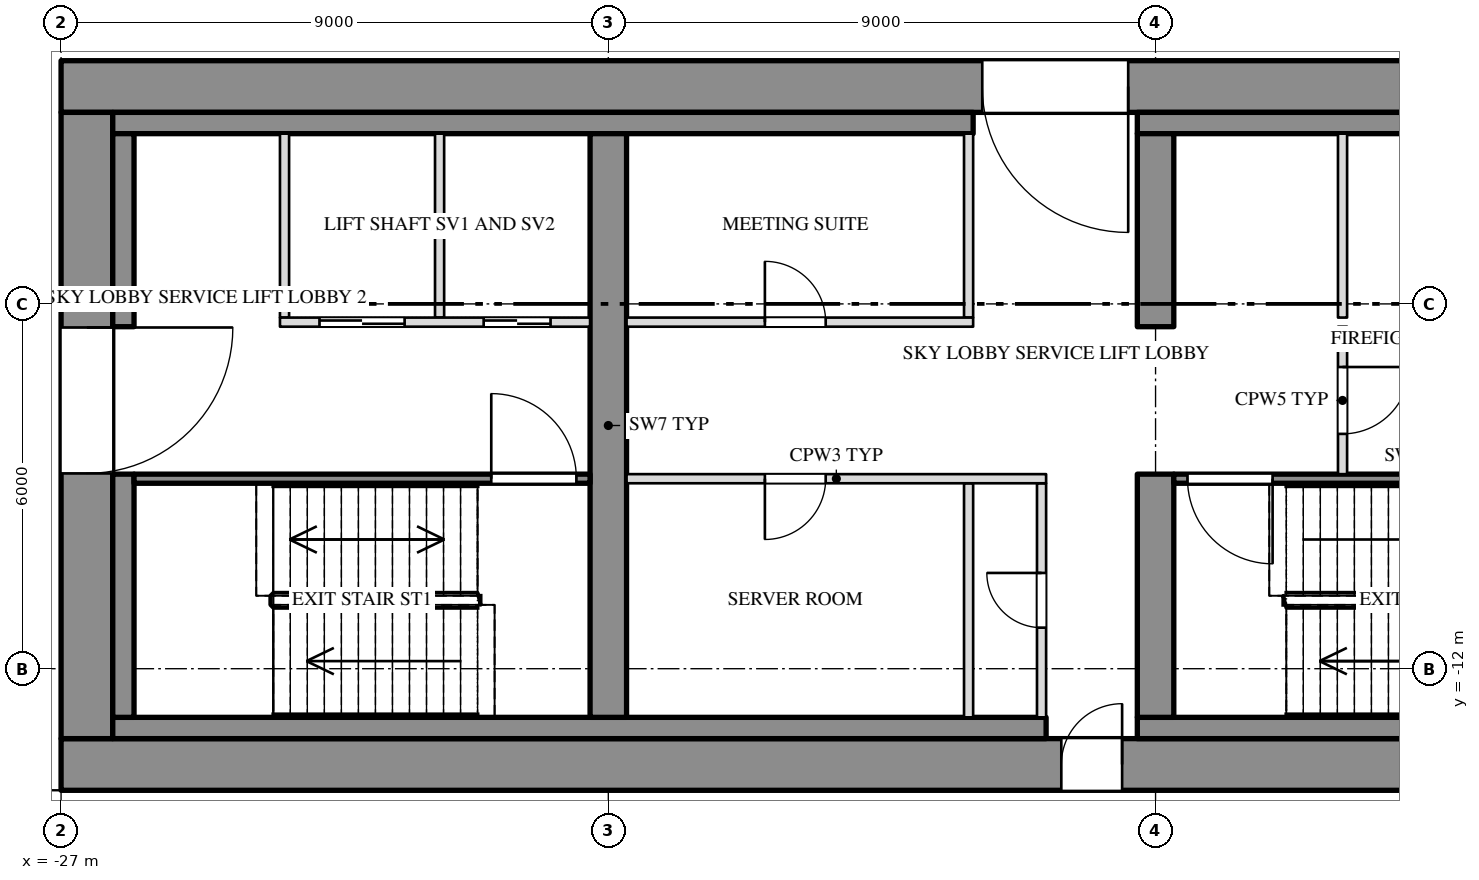
"""IFC4 building model, lengths in metres.
Left out: names, types, materials, properties, quantities, classifications, styles, units other than length and angle.
Written with IfcOpenShell. Run it as: python <this file> out.ifc"""

import sys

from ifc_helpers import new_model, si_unit, direction, frame, frame_2d, origin, place, context, subcontext, project, spatial, rectangle, extrude, element, fill, save


model = new_model("IFC4")
c1 = context("Model", 3, precision=1e-05, world=origin(), true_north=direction((0.0, 1.0)))
c2 = subcontext(c1, "Body", "Model", "MODEL_VIEW")
j1 = project(units=[si_unit("LENGTHUNIT", "METRE"), si_unit("PLANEANGLEUNIT", "RADIAN")], contexts=[c1])
p1 = place(None, origin())
s1 = spatial("IfcSite", under=j1, at=p1, CompositionType="ELEMENT")
p2 = place(p1, origin())
s2 = spatial("IfcBuilding", under=s1, at=p2, CompositionType="ELEMENT")
p3 = place(p2, frame((0.0, 0.0, 212.5)))
s3 = spatial("IfcBuildingStorey", under=s2, at=p3, CompositionType="ELEMENT", Elevation=212.5)
p4 = place(p3, frame((-27.0, -2.425, 0.0), z_axis=(0.0, 0.0, 1.0), x_axis=(1.0, 0.0, 0.0)))
e1 = element("IfcWall", 1, at=p4, inside=s3, PredefinedType="SHEAR", context=c2, shape_type="SweptSolid", body=[
    extrude(rectangle(XDim=54.0, YDim=0.85, at=frame_2d((27.0, 0.0))), origin(), (0.0, 0.0, 1.0), 3.65),
])
p5 = place(p4, frame((15.15, 0.0, 0.0)))
e2 = element("IfcOpeningElement", 2, at=p5, cuts=e1, PredefinedType="OPENING", context=c2, shape_type="SweptSolid", body=[
    extrude(rectangle(XDim=2.4, YDim=2.1, at=frame_2d((1.2, 1.05))), frame((0.0, 0.437, 0.0), z_axis=(0.0, -1.0, 0.0), x_axis=(1.0, 0.0, 0.0)), (0.0, 0.0, 1.0), 0.874),
])
p6 = place(p4, frame((36.45, 0.0, 0.0)))
e3 = element("IfcOpeningElement", 3, at=p6, cuts=e1, PredefinedType="OPENING", context=c2, shape_type="SweptSolid", body=[
    extrude(rectangle(XDim=2.4, YDim=2.1, at=frame_2d((1.2, 1.05))), frame((0.0, 0.437, 0.0), z_axis=(0.0, -1.0, 0.0), x_axis=(1.0, 0.0, 0.0)), (0.0, 0.0, 1.0), 0.874),
])
p7 = place(p3, frame((-27.0, -13.575, 0.0), z_axis=(0.0, 0.0, 1.0), x_axis=(1.0, 0.0, 0.0)))
e4 = element("IfcWall", 4, at=p7, inside=s3, PredefinedType="SHEAR", context=c2, shape_type="SweptSolid", body=[
    extrude(rectangle(XDim=54.0, YDim=0.85, at=frame_2d((27.0, 0.0))), origin(), (0.0, 0.0, 1.0), 3.65),
])
p8 = place(p7, frame((16.45, 0.0, 0.0)))
e5 = element("IfcOpeningElement", 5, at=p8, cuts=e4, PredefinedType="OPENING", context=c2, shape_type="SweptSolid", body=[
    extrude(rectangle(XDim=1.0, YDim=2.1, at=frame_2d((0.5, 1.05))), frame((0.0, 0.437, 0.0), z_axis=(0.0, -1.0, 0.0), x_axis=(1.0, 0.0, 0.0)), (0.0, 0.0, 1.0), 0.874),
])
p9 = place(p7, frame((36.55, 0.0, 0.0)))
e6 = element("IfcOpeningElement", 6, at=p9, cuts=e4, PredefinedType="OPENING", context=c2, shape_type="SweptSolid", body=[
    extrude(rectangle(XDim=1.0, YDim=2.1, at=frame_2d((0.5, 1.05))), frame((0.0, 0.437, 0.0), z_axis=(0.0, -1.0, 0.0), x_axis=(1.0, 0.0, 0.0)), (0.0, 0.0, 1.0), 0.874),
])
p10 = place(p3, frame((-26.575, -13.15, 0.0), z_axis=(0.0, 0.0, 1.0), x_axis=(0.0, 1.0, 0.0)))
e7 = element("IfcWall", 7, at=p10, inside=s3, PredefinedType="SHEAR", context=c2, shape_type="SweptSolid", body=[
    extrude(rectangle(XDim=10.3, YDim=0.85, at=frame_2d((5.15, 0.0))), origin(), (0.0, 0.0, 1.0), 3.65),
])
p11 = place(p10, frame((4.362, 0.0, 0.0)))
e8 = element("IfcOpeningElement", 8, at=p11, cuts=e7, PredefinedType="OPENING", context=c2, shape_type="SweptSolid", body=[
    extrude(rectangle(XDim=2.4, YDim=2.1, at=frame_2d((1.2, 1.05))), frame((0.0, 0.437, 0.0), z_axis=(0.0, -1.0, 0.0), x_axis=(1.0, 0.0, 0.0)), (0.0, 0.0, 1.0), 0.874),
])
p12 = place(p3, frame((-26.15, -3.025, 0.0), z_axis=(0.0, 0.0, 1.0), x_axis=(1.0, 0.0, 0.0)))
e9 = element("IfcWall", 9, at=p12, inside=s3, PredefinedType="SHEAR", context=c2, shape_type="SweptSolid", body=[
    extrude(rectangle(XDim=14.15, YDim=0.35, at=frame_2d((7.075, 0.0))), origin(), (0.0, 0.0, 1.0), 3.65),
])
p13 = place(p3, frame((-9.3, -3.025, 0.0), z_axis=(0.0, 0.0, 1.0), x_axis=(1.0, 0.0, 0.0)))
e10 = element("IfcWall", 10, at=p13, inside=s3, PredefinedType="SHEAR", context=c2, shape_type="SweptSolid", body=[
    extrude(rectangle(XDim=18.6, YDim=0.35, at=frame_2d((9.3, 0.0))), origin(), (0.0, 0.0, 1.0), 3.65),
])
p14 = place(p3, frame((-26.15, -12.975, 0.0), z_axis=(0.0, 0.0, 1.0), x_axis=(1.0, 0.0, 0.0)))
e11 = element("IfcWall", 11, at=p14, inside=s3, PredefinedType="SHEAR", context=c2, shape_type="SweptSolid", body=[
    extrude(rectangle(XDim=15.35, YDim=0.35, at=frame_2d((7.675, 0.0))), origin(), (0.0, 0.0, 1.0), 3.65),
])
p15 = place(p3, frame((-9.3, -12.975, 0.0), z_axis=(0.0, 0.0, 1.0), x_axis=(1.0, 0.0, 0.0)))
e12 = element("IfcWall", 12, at=p15, inside=s3, PredefinedType="SHEAR", context=c2, shape_type="SweptSolid", body=[
    extrude(rectangle(XDim=18.6, YDim=0.35, at=frame_2d((9.3, 0.0))), origin(), (0.0, 0.0, 1.0), 3.65),
])
p16 = place(p3, frame((-25.975, -12.8, 0.0), z_axis=(0.0, 0.0, 1.0), x_axis=(0.0, 1.0, 0.0)))
e13 = element("IfcWall", 13, at=p16, inside=s3, PredefinedType="SHEAR", context=c2, shape_type="SweptSolid", body=[
    extrude(rectangle(XDim=4.0, YDim=0.35, at=frame_2d((2.0, 0.0))), origin(), (0.0, 0.0, 1.0), 3.65),
])
p17 = place(p3, frame((-25.975, -6.375, 0.0), z_axis=(0.0, 0.0, 1.0), x_axis=(0.0, 1.0, 0.0)))
e14 = element("IfcWall", 14, at=p17, inside=s3, PredefinedType="SHEAR", context=c2, shape_type="SweptSolid", body=[
    extrude(rectangle(XDim=3.175, YDim=0.35, at=frame_2d((1.587, 0.0))), origin(), (0.0, 0.0, 1.0), 3.65),
])
p18 = place(p3, frame((-18.0, -12.8, 0.0), z_axis=(0.0, 0.0, 1.0), x_axis=(0.0, 1.0, 0.0)))
e15 = element("IfcWall", 15, at=p18, inside=s3, PredefinedType="SHEAR", context=c2, shape_type="SweptSolid", body=[
    extrude(rectangle(XDim=9.6, YDim=0.6, at=frame_2d((4.8, 0.0))), origin(), (0.0, 0.0, 1.0), 3.65),
])
p19 = place(p3, frame((-9.0, -12.8, 0.0), z_axis=(0.0, 0.0, 1.0), x_axis=(0.0, 1.0, 0.0)))
e16 = element("IfcWall", 16, at=p19, inside=s3, PredefinedType="SHEAR", context=c2, shape_type="SweptSolid", body=[
    extrude(rectangle(XDim=4.0, YDim=0.6, at=frame_2d((2.0, 0.0))), origin(), (0.0, 0.0, 1.0), 3.65),
])
p20 = place(p3, frame((-9.0, -6.375, 0.0), z_axis=(0.0, 0.0, 1.0), x_axis=(0.0, 1.0, 0.0)))
e17 = element("IfcWall", 17, at=p20, inside=s3, PredefinedType="SHEAR", context=c2, shape_type="SweptSolid", body=[
    extrude(rectangle(XDim=3.175, YDim=0.6, at=frame_2d((1.587, 0.0))), origin(), (0.0, 0.0, 1.0), 3.65),
])
for number, where, z_axis, x_axis in (
    (18, (-20.775, -6.225, 0.0), (0.0, 0.0, 1.0), (0.0, 1.0, 0.0)),
    (19, (-23.325, -6.225, 0.0), (0.0, 0.0, 1.0), (0.0, 1.0, 0.0)),
    (20, (-12.075, -6.225, 0.0), (0.0, 0.0, 1.0), (0.0, 1.0, 0.0)),
    (21, (-5.925, -6.225, 0.0), (0.0, 0.0, 1.0), (0.0, 1.0, 0.0)),
):
    element("IfcWall", number, at=place(p3, frame(where, z_axis=z_axis, x_axis=x_axis)), inside=s3, PredefinedType="PARTITIONING", context=c2, shape_type="SweptSolid", body=[
        extrude(rectangle(XDim=3.025, YDim=0.15, at=frame_2d((1.513, 0.0))), origin(), (0.0, 0.0, 1.0), 3.65),
    ])
p21 = place(p3, frame((-10.875, -12.8, 0.0), z_axis=(0.0, 0.0, 1.0), x_axis=(0.0, 1.0, 0.0)))
e22 = element("IfcWall", 22, at=p21, inside=s3, PredefinedType="PARTITIONING", context=c2, shape_type="SweptSolid", body=[
    extrude(rectangle(XDim=3.85, YDim=0.15, at=frame_2d((1.925, 0.0))), origin(), (0.0, 0.0, 1.0), 3.65),
])
p22 = place(p21, frame((1.475, 0.0, 0.0)))
e23 = element("IfcOpeningElement", 23, at=p22, cuts=e22, PredefinedType="OPENING", context=c2, shape_type="SweptSolid", body=[
    extrude(rectangle(XDim=0.9, YDim=2.1, at=frame_2d((0.45, 1.05))), frame((0.0, 0.087, 0.0), z_axis=(0.0, -1.0, 0.0), x_axis=(1.0, 0.0, 0.0)), (0.0, 0.0, 1.0), 0.174),
])
p23 = place(p3, frame((-12.075, -12.8, 0.0), z_axis=(0.0, 0.0, 1.0), x_axis=(0.0, 1.0, 0.0)))
e24 = element("IfcWall", 24, at=p23, inside=s3, PredefinedType="PARTITIONING", context=c2, shape_type="SweptSolid", body=[
    extrude(rectangle(XDim=3.85, YDim=0.15, at=frame_2d((1.925, 0.0))), origin(), (0.0, 0.0, 1.0), 3.65),
])
p24 = place(p3, frame((-5.925, -8.8, 0.0), z_axis=(0.0, 0.0, 1.0), x_axis=(0.0, 1.0, 0.0)))
e25 = element("IfcWall", 25, at=p24, inside=s3, PredefinedType="PARTITIONING", context=c2, shape_type="SweptSolid", body=[
    extrude(rectangle(XDim=2.425, YDim=0.15, at=frame_2d((1.212, 0.0))), origin(), (0.0, 0.0, 1.0), 3.65),
])
p25 = place(p24, frame((0.662, 0.0, 0.0)))
e26 = element("IfcOpeningElement", 26, at=p25, cuts=e25, PredefinedType="OPENING", context=c2, shape_type="SweptSolid", body=[
    extrude(rectangle(XDim=1.1, YDim=2.1, at=frame_2d((0.55, 1.05))), frame((0.0, 0.087, 0.0), z_axis=(0.0, -1.0, 0.0), x_axis=(1.0, 0.0, 0.0)), (0.0, 0.0, 1.0), 0.174),
])
p26 = place(p3, frame((-23.4, -6.3, 0.0), z_axis=(0.0, 0.0, 1.0), x_axis=(1.0, 0.0, 0.0)))
e27 = element("IfcWall", 27, at=p26, inside=s3, PredefinedType="PARTITIONING", context=c2, shape_type="SweptSolid", body=[
    extrude(rectangle(XDim=5.1, YDim=0.15, at=frame_2d((2.55, 0.0))), origin(), (0.0, 0.0, 1.0), 3.65),
])
p27 = place(p26, frame((0.65, 0.0, 0.0)))
e28 = element("IfcOpeningElement", 28, at=p27, cuts=e27, PredefinedType="OPENING", context=c2, shape_type="SweptSolid", body=[
    extrude(rectangle(XDim=1.4, YDim=2.1, at=frame_2d((0.7, 1.05))), frame((0.0, 0.087, 0.0), z_axis=(0.0, -1.0, 0.0), x_axis=(1.0, 0.0, 0.0)), (0.0, 0.0, 1.0), 0.174),
])
p28 = place(p26, frame((3.35, 0.0, 0.0)))
e29 = element("IfcOpeningElement", 29, at=p28, cuts=e27, PredefinedType="OPENING", context=c2, shape_type="SweptSolid", body=[
    extrude(rectangle(XDim=1.1, YDim=2.1, at=frame_2d((0.55, 1.05))), frame((0.0, 0.087, 0.0), z_axis=(0.0, -1.0, 0.0), x_axis=(1.0, 0.0, 0.0)), (0.0, 0.0, 1.0), 0.174),
])
p29 = place(p3, frame((-17.7, -6.3, 0.0), z_axis=(0.0, 0.0, 1.0), x_axis=(1.0, 0.0, 0.0)))
e30 = element("IfcWall", 30, at=p29, inside=s3, PredefinedType="PARTITIONING", context=c2, shape_type="SweptSolid", body=[
    extrude(rectangle(XDim=5.7, YDim=0.15, at=frame_2d((2.85, 0.0))), origin(), (0.0, 0.0, 1.0), 3.65),
])
p30 = place(p29, frame((2.275, 0.0, 0.0)))
e31 = element("IfcOpeningElement", 31, at=p30, cuts=e30, PredefinedType="OPENING", context=c2, shape_type="SweptSolid", body=[
    extrude(rectangle(XDim=1.0, YDim=2.1, at=frame_2d((0.5, 1.05))), frame((0.0, 0.087, 0.0), z_axis=(0.0, -1.0, 0.0), x_axis=(1.0, 0.0, 0.0)), (0.0, 0.0, 1.0), 0.174),
])
p31 = place(p3, frame((-25.8, -8.875, 0.0), z_axis=(0.0, 0.0, 1.0), x_axis=(1.0, 0.0, 0.0)))
e32 = element("IfcWall", 32, at=p31, inside=s3, PredefinedType="SHEAR", context=c2, shape_type="SweptSolid", body=[
    extrude(rectangle(XDim=7.5, YDim=0.15, at=frame_2d((3.75, 0.0))), origin(), (0.0, 0.0, 1.0), 3.65),
])
p32 = place(p31, frame((5.875, 0.0, 0.0)))
e33 = element("IfcOpeningElement", 33, at=p32, cuts=e32, PredefinedType="OPENING", context=c2, shape_type="SweptSolid", body=[
    extrude(rectangle(XDim=1.4, YDim=2.1, at=frame_2d((0.7, 1.05))), frame((0.0, 0.087, 0.0), z_axis=(0.0, -1.0, 0.0), x_axis=(1.0, 0.0, 0.0)), (0.0, 0.0, 1.0), 0.174),
])
p33 = place(p3, frame((-17.7, -8.875, 0.0), z_axis=(0.0, 0.0, 1.0), x_axis=(1.0, 0.0, 0.0)))
e34 = element("IfcWall", 34, at=p33, inside=s3, PredefinedType="PARTITIONING", context=c2, shape_type="SweptSolid", body=[
    extrude(rectangle(XDim=6.9, YDim=0.15, at=frame_2d((3.45, 0.0))), origin(), (0.0, 0.0, 1.0), 3.65),
])
p34 = place(p33, frame((2.275, 0.0, 0.0)))
e35 = element("IfcOpeningElement", 35, at=p34, cuts=e34, PredefinedType="OPENING", context=c2, shape_type="SweptSolid", body=[
    extrude(rectangle(XDim=1.0, YDim=2.1, at=frame_2d((0.5, 1.05))), frame((0.0, 0.087, 0.0), z_axis=(0.0, -1.0, 0.0), x_axis=(1.0, 0.0, 0.0)), (0.0, 0.0, 1.0), 0.174),
])
p35 = place(p3, frame((-8.7, -8.875, 0.0), z_axis=(0.0, 0.0, 1.0), x_axis=(1.0, 0.0, 0.0)))
e36 = element("IfcWall", 36, at=p35, inside=s3, PredefinedType="SHEAR", context=c2, shape_type="SweptSolid", body=[
    extrude(rectangle(XDim=8.4, YDim=0.15, at=frame_2d((4.2, 0.0))), origin(), (0.0, 0.0, 1.0), 3.65),
])
p36 = place(p35, frame((0.225, 0.0, 0.0)))
e37 = element("IfcOpeningElement", 37, at=p36, cuts=e36, PredefinedType="OPENING", context=c2, shape_type="SweptSolid", body=[
    extrude(rectangle(XDim=1.4, YDim=2.1, at=frame_2d((0.7, 1.05))), frame((0.0, 0.087, 0.0), z_axis=(0.0, -1.0, 0.0), x_axis=(1.0, 0.0, 0.0)), (0.0, 0.0, 1.0), 0.174),
])
p37 = place(p11, origin())
e38 = element("IfcDoor", 38, at=p37, inside=s3, OperationType="DOUBLE_DOOR_SINGLE_SWING", PredefinedType="DOOR", context=c2, shape_type="SweptSolid", body=[
    extrude(rectangle(XDim=2.4, YDim=2.1, at=frame_2d((1.2, 1.05))), frame((0.0, 0.025, 0.0), z_axis=(0.0, -1.0, 0.0), x_axis=(1.0, 0.0, 0.0)), (0.0, 0.0, 1.0), 0.05),
])
fill(e8, e38)
p38 = place(p27, origin())
e39 = element("IfcDoor", 39, at=p38, inside=s3, OperationType="SLIDING_TO_RIGHT", PredefinedType="DOOR", context=c2, shape_type="SweptSolid", body=[
    extrude(rectangle(XDim=1.4, YDim=2.1, at=frame_2d((0.7, 1.05))), frame((0.0, 0.025, 0.0), z_axis=(0.0, -1.0, 0.0), x_axis=(1.0, 0.0, 0.0)), (0.0, 0.0, 1.0), 0.05),
])
fill(e28, e39)
p39 = place(p28, origin())
e40 = element("IfcDoor", 40, at=p39, inside=s3, OperationType="SLIDING_TO_LEFT", PredefinedType="DOOR", context=c2, shape_type="SweptSolid", body=[
    extrude(rectangle(XDim=1.1, YDim=2.1, at=frame_2d((0.55, 1.05))), frame((0.0, 0.025, 0.0), z_axis=(0.0, -1.0, 0.0), x_axis=(1.0, 0.0, 0.0)), (0.0, 0.0, 1.0), 0.05),
])
fill(e29, e40)
p40 = place(p32, origin())
e41 = element("IfcDoor", 41, at=p40, inside=s3, OperationType="DOUBLE_DOOR_SINGLE_SWING", PredefinedType="DOOR", context=c2, shape_type="SweptSolid", body=[
    extrude(rectangle(XDim=1.4, YDim=2.1, at=frame_2d((0.7, 1.05))), frame((0.0, 0.025, 0.0), z_axis=(0.0, -1.0, 0.0), x_axis=(1.0, 0.0, 0.0)), (0.0, 0.0, 1.0), 0.05),
])
fill(e33, e41)
p41 = place(p34, origin())
e42 = element("IfcDoor", 42, at=p41, inside=s3, OperationType="SINGLE_SWING_RIGHT", PredefinedType="DOOR", context=c2, shape_type="SweptSolid", body=[
    extrude(rectangle(XDim=1.0, YDim=2.1, at=frame_2d((0.5, 1.05))), frame((0.0, 0.025, 0.0), z_axis=(0.0, -1.0, 0.0), x_axis=(1.0, 0.0, 0.0)), (0.0, 0.0, 1.0), 0.05),
])
fill(e35, e42)
p42 = place(p30, origin())
e43 = element("IfcDoor", 43, at=p42, inside=s3, OperationType="SINGLE_SWING_LEFT", PredefinedType="DOOR", context=c2, shape_type="SweptSolid", body=[
    extrude(rectangle(XDim=1.0, YDim=2.1, at=frame_2d((0.5, 1.05))), frame((0.0, 0.025, 0.0), z_axis=(0.0, -1.0, 0.0), x_axis=(1.0, 0.0, 0.0)), (0.0, 0.0, 1.0), 0.05),
])
fill(e31, e43)
p43 = place(p22, origin())
e44 = element("IfcDoor", 44, at=p43, inside=s3, OperationType="SINGLE_SWING_RIGHT", PredefinedType="DOOR", context=c2, shape_type="SweptSolid", body=[
    extrude(rectangle(XDim=0.9, YDim=2.1, at=frame_2d((0.45, 1.05))), frame((0.0, 0.025, 0.0), z_axis=(0.0, -1.0, 0.0), x_axis=(1.0, 0.0, 0.0)), (0.0, 0.0, 1.0), 0.05),
])
fill(e23, e44)
p44 = place(p5, origin())
e45 = element("IfcDoor", 45, at=p44, inside=s3, OperationType="DOUBLE_DOOR_SINGLE_SWING", PredefinedType="DOOR", context=c2, shape_type="SweptSolid", body=[
    extrude(rectangle(XDim=2.4, YDim=2.1, at=frame_2d((1.2, 1.05))), frame((0.0, 0.025, 0.0), z_axis=(0.0, -1.0, 0.0), x_axis=(1.0, 0.0, 0.0)), (0.0, 0.0, 1.0), 0.05),
])
fill(e2, e45)
p45 = place(p8, origin())
e46 = element("IfcDoor", 46, at=p45, inside=s3, OperationType="SINGLE_SWING_RIGHT", PredefinedType="DOOR", context=c2, shape_type="SweptSolid", body=[
    extrude(rectangle(XDim=1.0, YDim=2.1, at=frame_2d((0.5, 1.05))), frame((0.0, 0.025, 0.0), z_axis=(0.0, -1.0, 0.0), x_axis=(1.0, 0.0, 0.0)), (0.0, 0.0, 1.0), 0.05),
])
fill(e5, e46)
p46 = place(p36, origin())
e47 = element("IfcDoor", 47, at=p46, inside=s3, OperationType="DOUBLE_DOOR_SINGLE_SWING", PredefinedType="DOOR", context=c2, shape_type="SweptSolid", body=[
    extrude(rectangle(XDim=1.4, YDim=2.1, at=frame_2d((0.7, 1.05))), frame((0.0, 0.025, 0.0), z_axis=(0.0, -1.0, 0.0), x_axis=(1.0, 0.0, 0.0)), (0.0, 0.0, 1.0), 0.05),
])
fill(e37, e47)
p47 = place(p25, origin())
e48 = element("IfcDoor", 48, at=p47, inside=s3, OperationType="SINGLE_SWING_LEFT", PredefinedType="DOOR", context=c2, shape_type="SweptSolid", body=[
    extrude(rectangle(XDim=1.1, YDim=2.1, at=frame_2d((0.55, 1.05))), frame((0.0, 0.025, 0.0), z_axis=(0.0, -1.0, 0.0), x_axis=(1.0, 0.0, 0.0)), (0.0, 0.0, 1.0), 0.05),
])
fill(e26, e48)
save(model, sys.argv[1])
